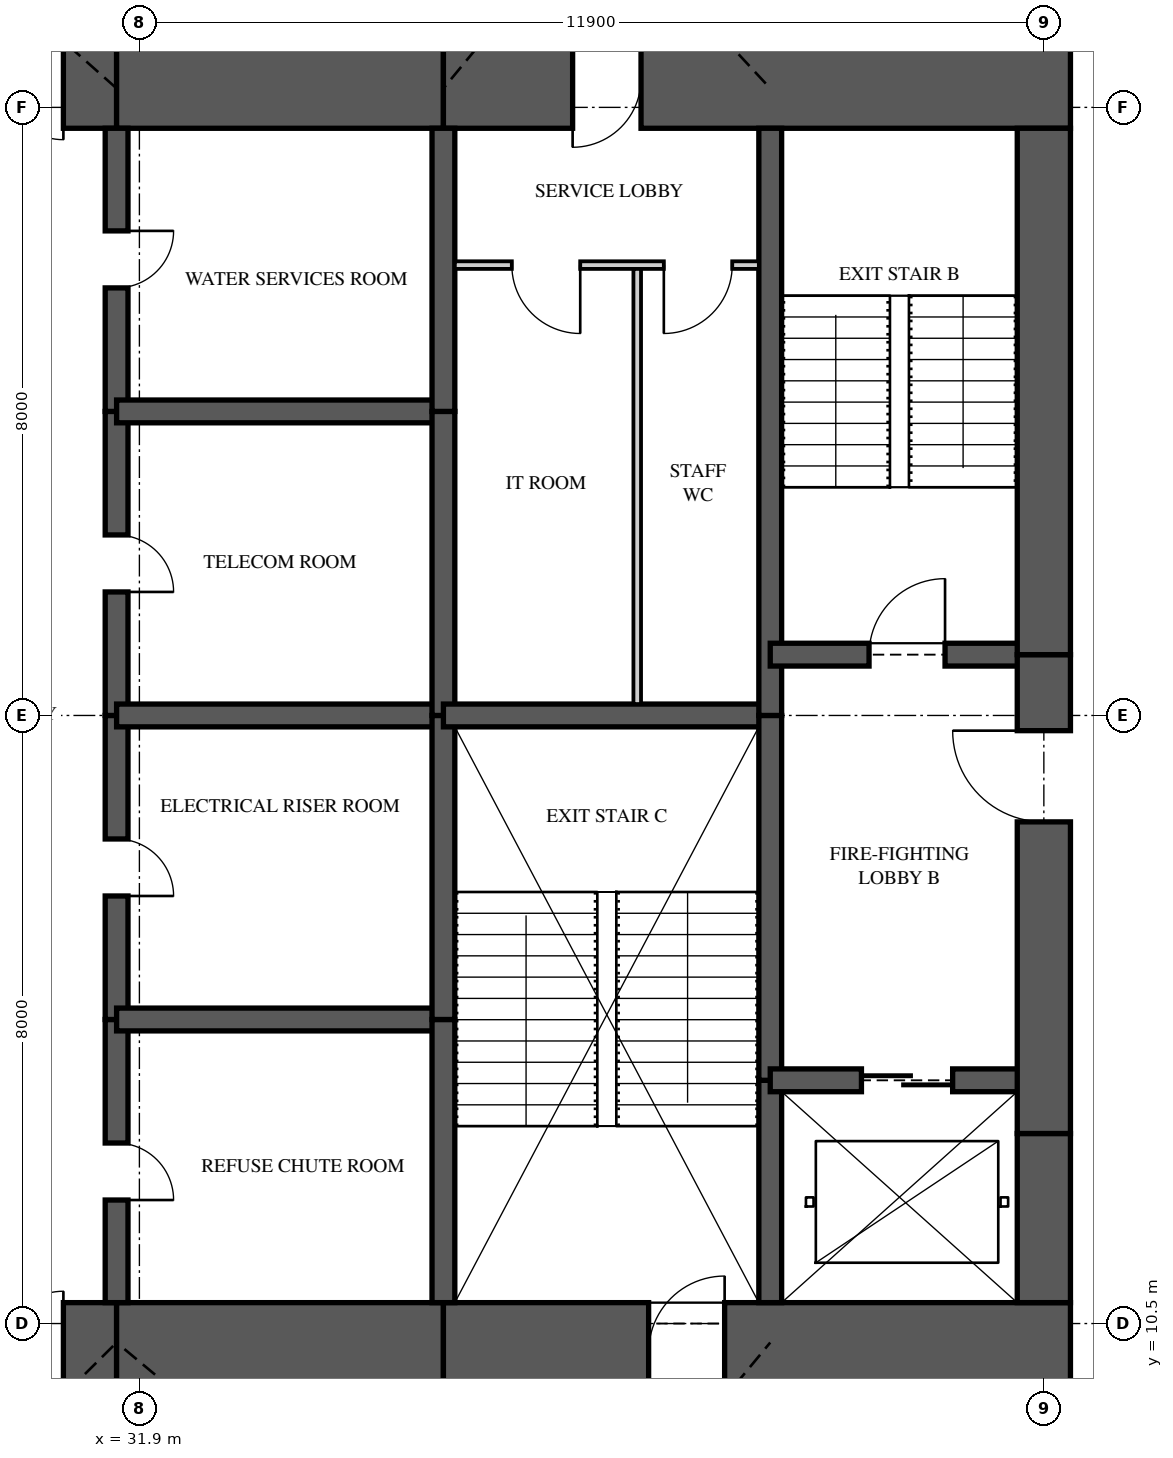
"""IFC4 building model, lengths in metres.
Left out: names, types, materials, properties, quantities, classifications, styles, units other than length and angle.
Written with IfcOpenShell. Run it as: python <this file> out.ifc"""

import sys

from ifc_helpers import new_model, si_unit, direction, frame, frame_2d, origin, place, context, subcontext, project, spatial, rectangle, extrude, element, fill, save


model = new_model("IFC4")
c1 = context("Model", 3, precision=1e-05, world=origin(), true_north=direction((0.0, 1.0)))
c2 = subcontext(c1, "Body", "Model", "MODEL_VIEW")
j1 = project(units=[si_unit("LENGTHUNIT", "METRE"), si_unit("PLANEANGLEUNIT", "RADIAN")], contexts=[c1])
p1 = place(None, origin())
s1 = spatial("IfcSite", under=j1, at=p1, CompositionType="ELEMENT")
p2 = place(p1, origin())
s2 = spatial("IfcBuilding", under=s1, at=p2, CompositionType="ELEMENT")
p3 = place(p2, frame((0.0, 0.0, 204.6)))
s3 = spatial("IfcBuildingStorey", under=s2, at=p3, CompositionType="ELEMENT", Elevation=204.6)
p4 = place(p3, frame((26.0, 10.125, 0.0), z_axis=(0.0, 0.0, 1.0), x_axis=(1.0, 0.0, 0.0)))
e1 = element("IfcWall", 1, at=p4, inside=s3, PredefinedType="SHEAR", context=c2, shape_type="SweptSolid", body=[
    extrude(rectangle(XDim=5.6, YDim=1.3, at=frame_2d((2.8, 0.0))), origin(), (0.0, 0.0, 1.0), 3.35),
])
p5 = place(p4, frame((3.3, 0.0, 0.0)))
e2 = element("IfcOpeningElement", 2, at=p5, cuts=e1, PredefinedType="OPENING", context=c2, shape_type="SweptSolid", body=[
    extrude(rectangle(XDim=1.6, YDim=2.1, at=frame_2d((0.8, 1.05))), frame((0.0, 0.66, 0.0), z_axis=(0.0, -1.0, 0.0), x_axis=(1.0, 0.0, 0.0)), (0.0, 0.0, 1.0), 1.32),
])
p6 = place(p3, frame((31.6, 10.125, 0.0), z_axis=(0.0, 0.0, 1.0), x_axis=(1.0, 0.0, 0.0)))
e3 = element("IfcWall", 3, at=p6, inside=s3, PredefinedType="SHEAR", context=c2, shape_type="SweptSolid", body=[
    extrude(rectangle(XDim=4.3, YDim=1.3, at=frame_2d((2.15, 0.0))), origin(), (0.0, 0.0, 1.0), 3.35),
])
p7 = place(p3, frame((35.9, 10.125, 0.0), z_axis=(0.0, 0.0, 1.0), x_axis=(1.0, 0.0, 0.0)))
e4 = element("IfcWall", 4, at=p7, inside=s3, PredefinedType="SHEAR", context=c2, shape_type="SweptSolid", body=[
    extrude(rectangle(XDim=8.25, YDim=1.3, at=frame_2d((4.125, 0.0))), origin(), (0.0, 0.0, 1.0), 3.35),
])
p8 = place(p7, frame((2.7, 0.0, 0.0)))
e5 = element("IfcOpeningElement", 5, at=p8, cuts=e4, PredefinedType="OPENING", context=c2, shape_type="SweptSolid", body=[
    extrude(rectangle(XDim=1.0, YDim=2.1, at=frame_2d((0.5, 1.05))), frame((0.0, 0.66, 0.0), z_axis=(0.0, -1.0, 0.0), x_axis=(1.0, 0.0, 0.0)), (0.0, 0.0, 1.0), 1.32),
])
p9 = place(p3, frame((44.15, 26.875, 0.0), z_axis=(0.0, 0.0, 1.0), x_axis=(-1.0, 0.0, 0.0)))
e6 = element("IfcWall", 6, at=p9, inside=s3, PredefinedType="SHEAR", context=c2, shape_type="SweptSolid", body=[
    extrude(rectangle(XDim=8.25, YDim=1.3, at=frame_2d((4.125, 0.0))), origin(), (0.0, 0.0, 1.0), 3.35),
])
p10 = place(p9, frame((5.65, 0.0, 0.0)))
e7 = element("IfcOpeningElement", 7, at=p10, cuts=e6, PredefinedType="OPENING", context=c2, shape_type="SweptSolid", body=[
    extrude(rectangle(XDim=0.9, YDim=2.1, at=frame_2d((0.45, 1.05))), frame((0.0, 0.66, 0.0), z_axis=(0.0, -1.0, 0.0), x_axis=(1.0, 0.0, 0.0)), (0.0, 0.0, 1.0), 1.32),
])
p11 = place(p3, frame((35.9, 26.875, 0.0), z_axis=(0.0, 0.0, 1.0), x_axis=(-1.0, 0.0, 0.0)))
e8 = element("IfcWall", 8, at=p11, inside=s3, PredefinedType="SHEAR", context=c2, shape_type="SweptSolid", body=[
    extrude(rectangle(XDim=4.3, YDim=1.3, at=frame_2d((2.15, 0.0))), origin(), (0.0, 0.0, 1.0), 3.35),
])
p12 = place(p3, frame((31.6, 26.875, 0.0), z_axis=(0.0, 0.0, 1.0), x_axis=(-1.0, 0.0, 0.0)))
e9 = element("IfcWall", 9, at=p12, inside=s3, PredefinedType="SHEAR", context=c2, shape_type="SweptSolid", body=[
    extrude(rectangle(XDim=5.6, YDim=1.3, at=frame_2d((2.8, 0.0))), origin(), (0.0, 0.0, 1.0), 3.35),
])
p13 = place(p12, frame((0.7, 0.0, 0.0)))
e10 = element("IfcOpeningElement", 10, at=p13, cuts=e9, PredefinedType="OPENING", context=c2, shape_type="SweptSolid", body=[
    extrude(rectangle(XDim=1.6, YDim=2.1, at=frame_2d((0.8, 1.05))), frame((0.0, 0.66, 0.0), z_axis=(0.0, -1.0, 0.0), x_axis=(1.0, 0.0, 0.0)), (0.0, 0.0, 1.0), 1.32),
])
p14 = place(p3, frame((43.8, 10.775, 0.0), z_axis=(0.0, 0.0, 1.0), x_axis=(0.0, 1.0, 0.0)))
e11 = element("IfcWall", 11, at=p14, inside=s3, PredefinedType="SHEAR", context=c2, shape_type="SweptSolid", body=[
    extrude(rectangle(XDim=2.225, YDim=0.7, at=frame_2d((1.113, 0.0))), origin(), (0.0, 0.0, 1.0), 3.35),
])
p15 = place(p3, frame((43.8, 13.0, 0.0), z_axis=(0.0, 0.0, 1.0), x_axis=(0.0, 1.0, 0.0)))
e12 = element("IfcWall", 12, at=p15, inside=s3, PredefinedType="SHEAR", context=c2, shape_type="SweptSolid", body=[
    extrude(rectangle(XDim=6.3, YDim=0.7, at=frame_2d((3.15, 0.0))), origin(), (0.0, 0.0, 1.0), 3.35),
])
p16 = place(p15, frame((4.1, 0.0, 0.0)))
e13 = element("IfcOpeningElement", 13, at=p16, cuts=e12, PredefinedType="OPENING", context=c2, shape_type="SweptSolid", body=[
    extrude(rectangle(XDim=1.2, YDim=2.2, at=frame_2d((0.6, 1.1))), frame((0.0, 0.36, 0.0), z_axis=(0.0, -1.0, 0.0), x_axis=(1.0, 0.0, 0.0)), (0.0, 0.0, 1.0), 0.72),
])
p17 = place(p3, frame((43.8, 19.3, 0.0), z_axis=(0.0, 0.0, 1.0), x_axis=(0.0, 1.0, 0.0)))
e14 = element("IfcWall", 14, at=p17, inside=s3, PredefinedType="SHEAR", context=c2, shape_type="SweptSolid", body=[
    extrude(rectangle(XDim=6.925, YDim=0.7, at=frame_2d((3.462, 0.0))), origin(), (0.0, 0.0, 1.0), 3.35),
])
p18 = place(p3, frame((31.6, 10.775, 0.0), z_axis=(0.0, 0.0, 1.0), x_axis=(0.0, 1.0, 0.0)))
e15 = element("IfcWall", 15, at=p18, inside=s3, PredefinedType="SHEAR", context=c2, shape_type="SweptSolid", body=[
    extrude(rectangle(XDim=3.725, YDim=0.3, at=frame_2d((1.863, 0.0))), origin(), (0.0, 0.0, 1.0), 3.35),
])
p19 = place(p18, frame((1.35, 0.0, 0.0)))
e16 = element("IfcOpeningElement", 16, at=p19, cuts=e15, PredefinedType="OPENING", context=c2, shape_type="SweptSolid", body=[
    extrude(rectangle(XDim=0.75, YDim=2.1, at=frame_2d((0.375, 1.05))), frame((0.0, 0.16, 0.0), z_axis=(0.0, -1.0, 0.0), x_axis=(1.0, 0.0, 0.0)), (0.0, 0.0, 1.0), 0.32),
])
p20 = place(p3, frame((31.6, 14.5, 0.0), z_axis=(0.0, 0.0, 1.0), x_axis=(0.0, 1.0, 0.0)))
e17 = element("IfcWall", 17, at=p20, inside=s3, PredefinedType="SHEAR", context=c2, shape_type="SweptSolid", body=[
    extrude(rectangle(XDim=4.0, YDim=0.3, at=frame_2d((2.0, 0.0))), origin(), (0.0, 0.0, 1.0), 3.35),
])
p21 = place(p20, frame((1.625, 0.0, 0.0)))
e18 = element("IfcOpeningElement", 18, at=p21, cuts=e17, PredefinedType="OPENING", context=c2, shape_type="SweptSolid", body=[
    extrude(rectangle(XDim=0.75, YDim=2.1, at=frame_2d((0.375, 1.05))), frame((0.0, 0.16, 0.0), z_axis=(0.0, -1.0, 0.0), x_axis=(1.0, 0.0, 0.0)), (0.0, 0.0, 1.0), 0.32),
])
p22 = place(p3, frame((31.6, 18.5, 0.0), z_axis=(0.0, 0.0, 1.0), x_axis=(0.0, 1.0, 0.0)))
e19 = element("IfcWall", 19, at=p22, inside=s3, PredefinedType="SHEAR", context=c2, shape_type="SweptSolid", body=[
    extrude(rectangle(XDim=4.0, YDim=0.3, at=frame_2d((2.0, 0.0))), origin(), (0.0, 0.0, 1.0), 3.35),
])
p23 = place(p22, frame((1.625, 0.0, 0.0)))
e20 = element("IfcOpeningElement", 20, at=p23, cuts=e19, PredefinedType="OPENING", context=c2, shape_type="SweptSolid", body=[
    extrude(rectangle(XDim=0.75, YDim=2.1, at=frame_2d((0.375, 1.05))), frame((0.0, 0.16, 0.0), z_axis=(0.0, -1.0, 0.0), x_axis=(1.0, 0.0, 0.0)), (0.0, 0.0, 1.0), 0.32),
])
p24 = place(p3, frame((31.6, 22.5, 0.0), z_axis=(0.0, 0.0, 1.0), x_axis=(0.0, 1.0, 0.0)))
e21 = element("IfcWall", 21, at=p24, inside=s3, PredefinedType="SHEAR", context=c2, shape_type="SweptSolid", body=[
    extrude(rectangle(XDim=3.725, YDim=0.3, at=frame_2d((1.863, 0.0))), origin(), (0.0, 0.0, 1.0), 3.35),
])
p25 = place(p24, frame((1.625, 0.0, 0.0)))
e22 = element("IfcOpeningElement", 22, at=p25, cuts=e21, PredefinedType="OPENING", context=c2, shape_type="SweptSolid", body=[
    extrude(rectangle(XDim=0.75, YDim=2.1, at=frame_2d((0.375, 1.05))), frame((0.0, 0.16, 0.0), z_axis=(0.0, -1.0, 0.0), x_axis=(1.0, 0.0, 0.0)), (0.0, 0.0, 1.0), 0.32),
])
p26 = place(p3, frame((35.9, 10.775, 0.0), z_axis=(0.0, 0.0, 1.0), x_axis=(0.0, 1.0, 0.0)))
e23 = element("IfcWall", 23, at=p26, inside=s3, PredefinedType="SHEAR", context=c2, shape_type="SweptSolid", body=[
    extrude(rectangle(XDim=3.725, YDim=0.3, at=frame_2d((1.863, 0.0))), origin(), (0.0, 0.0, 1.0), 3.35),
])
for number, where, z_axis, x_axis in (
    (24, (35.9, 14.5, 0.0), (0.0, 0.0, 1.0), (0.0, 1.0, 0.0)),
    (25, (35.9, 18.5, 0.0), (0.0, 0.0, 1.0), (0.0, 1.0, 0.0)),
):
    element("IfcWall", number, at=place(p3, frame(where, z_axis=z_axis, x_axis=x_axis)), inside=s3, PredefinedType="SHEAR", context=c2, shape_type="SweptSolid", body=[
        extrude(rectangle(XDim=4.0, YDim=0.3, at=frame_2d((2.0, 0.0))), origin(), (0.0, 0.0, 1.0), 3.35),
    ])
p27 = place(p3, frame((35.9, 22.5, 0.0), z_axis=(0.0, 0.0, 1.0), x_axis=(0.0, 1.0, 0.0)))
e26 = element("IfcWall", 26, at=p27, inside=s3, PredefinedType="SHEAR", context=c2, shape_type="SweptSolid", body=[
    extrude(rectangle(XDim=3.725, YDim=0.3, at=frame_2d((1.863, 0.0))), origin(), (0.0, 0.0, 1.0), 3.35),
])
p28 = place(p3, frame((40.2, 10.775, 0.0), z_axis=(0.0, 0.0, 1.0), x_axis=(0.0, 1.0, 0.0)))
e27 = element("IfcWall", 27, at=p28, inside=s3, PredefinedType="SHEAR", context=c2, shape_type="SweptSolid", body=[
    extrude(rectangle(XDim=2.925, YDim=0.3, at=frame_2d((1.462, 0.0))), origin(), (0.0, 0.0, 1.0), 3.35),
])
p29 = place(p3, frame((40.2, 13.7, 0.0), z_axis=(0.0, 0.0, 1.0), x_axis=(0.0, 1.0, 0.0)))
e28 = element("IfcWall", 28, at=p29, inside=s3, PredefinedType="SHEAR", context=c2, shape_type="SweptSolid", body=[
    extrude(rectangle(XDim=4.8, YDim=0.3, at=frame_2d((2.4, 0.0))), origin(), (0.0, 0.0, 1.0), 3.35),
])
p30 = place(p3, frame((40.2, 18.5, 0.0), z_axis=(0.0, 0.0, 1.0), x_axis=(0.0, 1.0, 0.0)))
e29 = element("IfcWall", 29, at=p30, inside=s3, PredefinedType="SHEAR", context=c2, shape_type="SweptSolid", body=[
    extrude(rectangle(XDim=7.725, YDim=0.3, at=frame_2d((3.863, 0.0))), origin(), (0.0, 0.0, 1.0), 3.35),
])
for number, where, z_axis, x_axis in (
    (30, (31.6, 14.5, 0.0), (0.0, 0.0, 1.0), (1.0, 0.0, 0.0)),
    (31, (31.6, 18.5, 0.0), (0.0, 0.0, 1.0), (1.0, 0.0, 0.0)),
    (32, (31.6, 22.5, 0.0), (0.0, 0.0, 1.0), (1.0, 0.0, 0.0)),
):
    element("IfcWall", number, at=place(p3, frame(where, z_axis=z_axis, x_axis=x_axis)), inside=s3, PredefinedType="SHEAR", context=c2, shape_type="SweptSolid", body=[
        extrude(rectangle(XDim=4.3, YDim=0.3, at=frame_2d((2.15, 0.0))), origin(), (0.0, 0.0, 1.0), 3.35),
    ])
p31 = place(p3, frame((35.9, 18.5, 0.0), z_axis=(0.0, 0.0, 1.0), x_axis=(1.0, 0.0, 0.0)))
e33 = element("IfcWall", 33, at=p31, inside=s3, PredefinedType="SHEAR", context=c2, shape_type="SweptSolid", body=[
    extrude(rectangle(XDim=4.3, YDim=0.3, at=frame_2d((2.15, 0.0))), origin(), (0.0, 0.0, 1.0), 3.35),
])
p32 = place(p3, frame((40.2, 13.7, 0.0), z_axis=(0.0, 0.0, 1.0), x_axis=(1.0, 0.0, 0.0)))
e34 = element("IfcWall", 34, at=p32, inside=s3, PredefinedType="SHEAR", context=c2, shape_type="SweptSolid", body=[
    extrude(rectangle(XDim=3.6, YDim=0.3, at=frame_2d((1.8, 0.0))), origin(), (0.0, 0.0, 1.0), 3.35),
])
p33 = place(p32, frame((1.2, 0.0, 0.0)))
e35 = element("IfcOpeningElement", 35, at=p33, cuts=e34, PredefinedType="OPENING", context=c2, shape_type="SweptSolid", body=[
    extrude(rectangle(XDim=1.2, YDim=2.1, at=frame_2d((0.6, 1.05))), frame((0.0, 0.16, 0.0), z_axis=(0.0, -1.0, 0.0), x_axis=(1.0, 0.0, 0.0)), (0.0, 0.0, 1.0), 0.32),
])
p34 = place(p3, frame((40.2, 19.3, 0.0), z_axis=(0.0, 0.0, 1.0), x_axis=(1.0, 0.0, 0.0)))
e36 = element("IfcWall", 36, at=p34, inside=s3, PredefinedType="SHEAR", context=c2, shape_type="SweptSolid", body=[
    extrude(rectangle(XDim=3.6, YDim=0.3, at=frame_2d((1.8, 0.0))), origin(), (0.0, 0.0, 1.0), 3.35),
])
p35 = place(p34, frame((1.3, 0.0, 0.0)))
e37 = element("IfcOpeningElement", 37, at=p35, cuts=e36, PredefinedType="OPENING", context=c2, shape_type="SweptSolid", body=[
    extrude(rectangle(XDim=1.0, YDim=2.1, at=frame_2d((0.5, 1.05))), frame((0.0, 0.16, 0.0), z_axis=(0.0, -1.0, 0.0), x_axis=(1.0, 0.0, 0.0)), (0.0, 0.0, 1.0), 0.32),
])
p36 = place(p3, frame((36.05, 24.425, 0.0), z_axis=(0.0, 0.0, 1.0), x_axis=(1.0, 0.0, 0.0)))
e38 = element("IfcWall", 38, at=p36, inside=s3, PredefinedType="PARTITIONING", context=c2, shape_type="SweptSolid", body=[
    extrude(rectangle(XDim=4.0, YDim=0.1, at=frame_2d((2.0, 0.0))), origin(), (0.0, 0.0, 1.0), 3.07),
])
p37 = place(p36, frame((0.75, 0.0, 0.0)))
e39 = element("IfcOpeningElement", 39, at=p37, cuts=e38, PredefinedType="OPENING", context=c2, shape_type="SweptSolid", body=[
    extrude(rectangle(XDim=0.9, YDim=2.1, at=frame_2d((0.45, 1.05))), frame((0.0, 0.06, 0.0), z_axis=(0.0, -1.0, 0.0), x_axis=(1.0, 0.0, 0.0)), (0.0, 0.0, 1.0), 0.12),
])
p38 = place(p36, frame((2.75, 0.0, 0.0)))
e40 = element("IfcOpeningElement", 40, at=p38, cuts=e38, PredefinedType="OPENING", context=c2, shape_type="SweptSolid", body=[
    extrude(rectangle(XDim=0.9, YDim=2.1, at=frame_2d((0.45, 1.05))), frame((0.0, 0.06, 0.0), z_axis=(0.0, -1.0, 0.0), x_axis=(1.0, 0.0, 0.0)), (0.0, 0.0, 1.0), 0.12),
])
p39 = place(p3, frame((38.45, 18.65, 0.0), z_axis=(0.0, 0.0, 1.0), x_axis=(0.0, 1.0, 0.0)))
e41 = element("IfcWall", 41, at=p39, inside=s3, PredefinedType="PARTITIONING", context=c2, shape_type="SweptSolid", body=[
    extrude(rectangle(XDim=5.725, YDim=0.1, at=frame_2d((2.863, 0.0))), origin(), (0.0, 0.0, 1.0), 3.07),
])
p40 = place(p37, frame((0.9, 0.0, 0.0), z_axis=(0.0, 0.0, 1.0), x_axis=(-1.0, 0.0, 0.0)))
e42 = element("IfcDoor", 42, at=p40, inside=s3, OperationType="SINGLE_SWING_LEFT", PredefinedType="DOOR", context=c2, shape_type="SweptSolid", body=[
    extrude(rectangle(XDim=0.9, YDim=2.1, at=frame_2d((0.45, 1.05))), frame((0.0, 0.025, 0.0), z_axis=(0.0, -1.0, 0.0), x_axis=(1.0, 0.0, 0.0)), (0.0, 0.0, 1.0), 0.05),
])
fill(e39, e42)
p41 = place(p38, frame((0.9, 0.0, 0.0), z_axis=(0.0, 0.0, 1.0), x_axis=(-1.0, 0.0, 0.0)))
e43 = element("IfcDoor", 43, at=p41, inside=s3, OperationType="SINGLE_SWING_RIGHT", PredefinedType="DOOR", context=c2, shape_type="SweptSolid", body=[
    extrude(rectangle(XDim=0.9, YDim=2.1, at=frame_2d((0.45, 1.05))), frame((0.0, 0.025, 0.0), z_axis=(0.0, -1.0, 0.0), x_axis=(1.0, 0.0, 0.0)), (0.0, 0.0, 1.0), 0.05),
])
fill(e40, e43)
p42 = place(p35, origin())
e44 = element("IfcDoor", 44, at=p42, inside=s3, OperationType="SINGLE_SWING_RIGHT", PredefinedType="DOOR", context=c2, shape_type="SweptSolid", body=[
    extrude(rectangle(XDim=1.0, YDim=2.1, at=frame_2d((0.5, 1.05))), frame((0.0, 0.025, 0.0), z_axis=(0.0, -1.0, 0.0), x_axis=(1.0, 0.0, 0.0)), (0.0, 0.0, 1.0), 0.05),
])
fill(e37, e44)
p43 = place(p16, origin())
e45 = element("IfcDoor", 45, at=p43, inside=s3, OperationType="SINGLE_SWING_RIGHT", PredefinedType="DOOR", context=c2, shape_type="SweptSolid", body=[
    extrude(rectangle(XDim=1.2, YDim=2.2, at=frame_2d((0.6, 1.1))), frame((0.0, 0.025, 0.0), z_axis=(0.0, -1.0, 0.0), x_axis=(1.0, 0.0, 0.0)), (0.0, 0.0, 1.0), 0.05),
])
fill(e13, e45)
p44 = place(p33, origin())
e46 = element("IfcDoor", 46, at=p44, inside=s3, OperationType="SLIDING_TO_LEFT", PredefinedType="DOOR", context=c2, shape_type="SweptSolid", body=[
    extrude(rectangle(XDim=1.2, YDim=2.1, at=frame_2d((0.6, 1.05))), frame((0.0, 0.025, 0.0), z_axis=(0.0, -1.0, 0.0), x_axis=(1.0, 0.0, 0.0)), (0.0, 0.0, 1.0), 0.05),
])
fill(e35, e46)
p45 = place(p5, origin())
e47 = element("IfcDoor", 47, at=p45, inside=s3, OperationType="DOUBLE_DOOR_SINGLE_SWING", PredefinedType="DOOR", context=c2, shape_type="SweptSolid", body=[
    extrude(rectangle(XDim=1.6, YDim=2.1, at=frame_2d((0.8, 1.05))), frame((0.0, 0.025, 0.0), z_axis=(0.0, -1.0, 0.0), x_axis=(1.0, 0.0, 0.0)), (0.0, 0.0, 1.0), 0.05),
])
fill(e2, e47)
p46 = place(p13, origin())
e48 = element("IfcDoor", 48, at=p46, inside=s3, OperationType="DOUBLE_DOOR_SINGLE_SWING", PredefinedType="DOOR", context=c2, shape_type="SweptSolid", body=[
    extrude(rectangle(XDim=1.6, YDim=2.1, at=frame_2d((0.8, 1.05))), frame((0.0, 0.025, 0.0), z_axis=(0.0, -1.0, 0.0), x_axis=(1.0, 0.0, 0.0)), (0.0, 0.0, 1.0), 0.05),
])
fill(e10, e48)
p47 = place(p19, frame((0.75, 0.0, 0.0), z_axis=(0.0, 0.0, 1.0), x_axis=(-1.0, 0.0, 0.0)))
e49 = element("IfcDoor", 49, at=p47, inside=s3, OperationType="SINGLE_SWING_RIGHT", PredefinedType="DOOR", context=c2, shape_type="SweptSolid", body=[
    extrude(rectangle(XDim=0.75, YDim=2.1, at=frame_2d((0.375, 1.05))), frame((0.0, 0.025, 0.0), z_axis=(0.0, -1.0, 0.0), x_axis=(1.0, 0.0, 0.0)), (0.0, 0.0, 1.0), 0.05),
])
fill(e16, e49)
p48 = place(p21, frame((0.75, 0.0, 0.0), z_axis=(0.0, 0.0, 1.0), x_axis=(-1.0, 0.0, 0.0)))
e50 = element("IfcDoor", 50, at=p48, inside=s3, OperationType="SINGLE_SWING_RIGHT", PredefinedType="DOOR", context=c2, shape_type="SweptSolid", body=[
    extrude(rectangle(XDim=0.75, YDim=2.1, at=frame_2d((0.375, 1.05))), frame((0.0, 0.025, 0.0), z_axis=(0.0, -1.0, 0.0), x_axis=(1.0, 0.0, 0.0)), (0.0, 0.0, 1.0), 0.05),
])
fill(e18, e50)
p49 = place(p23, frame((0.75, 0.0, 0.0), z_axis=(0.0, 0.0, 1.0), x_axis=(-1.0, 0.0, 0.0)))
e51 = element("IfcDoor", 51, at=p49, inside=s3, OperationType="SINGLE_SWING_RIGHT", PredefinedType="DOOR", context=c2, shape_type="SweptSolid", body=[
    extrude(rectangle(XDim=0.75, YDim=2.1, at=frame_2d((0.375, 1.05))), frame((0.0, 0.025, 0.0), z_axis=(0.0, -1.0, 0.0), x_axis=(1.0, 0.0, 0.0)), (0.0, 0.0, 1.0), 0.05),
])
fill(e20, e51)
p50 = place(p25, frame((0.75, 0.0, 0.0), z_axis=(0.0, 0.0, 1.0), x_axis=(-1.0, 0.0, 0.0)))
e52 = element("IfcDoor", 52, at=p50, inside=s3, OperationType="SINGLE_SWING_LEFT", PredefinedType="DOOR", context=c2, shape_type="SweptSolid", body=[
    extrude(rectangle(XDim=0.75, YDim=2.1, at=frame_2d((0.375, 1.05))), frame((0.0, 0.025, 0.0), z_axis=(0.0, -1.0, 0.0), x_axis=(1.0, 0.0, 0.0)), (0.0, 0.0, 1.0), 0.05),
])
fill(e22, e52)
p51 = place(p8, origin())
e53 = element("IfcDoor", 53, at=p51, inside=s3, OperationType="SINGLE_SWING_RIGHT", PredefinedType="DOOR", context=c2, shape_type="SweptSolid", body=[
    extrude(rectangle(XDim=1.0, YDim=2.1, at=frame_2d((0.5, 1.05))), frame((0.0, 0.025, 0.0), z_axis=(0.0, -1.0, 0.0), x_axis=(1.0, 0.0, 0.0)), (0.0, 0.0, 1.0), 0.05),
])
fill(e5, e53)
p52 = place(p10, origin())
e54 = element("IfcDoor", 54, at=p52, inside=s3, OperationType="SINGLE_SWING_RIGHT", PredefinedType="DOOR", context=c2, shape_type="SweptSolid", body=[
    extrude(rectangle(XDim=0.9, YDim=2.1, at=frame_2d((0.45, 1.05))), frame((0.0, 0.47, 0.0), z_axis=(0.0, -1.0, 0.0), x_axis=(1.0, 0.0, 0.0)), (0.0, 0.0, 1.0), 0.8),
])
fill(e7, e54)
save(model, sys.argv[1])
